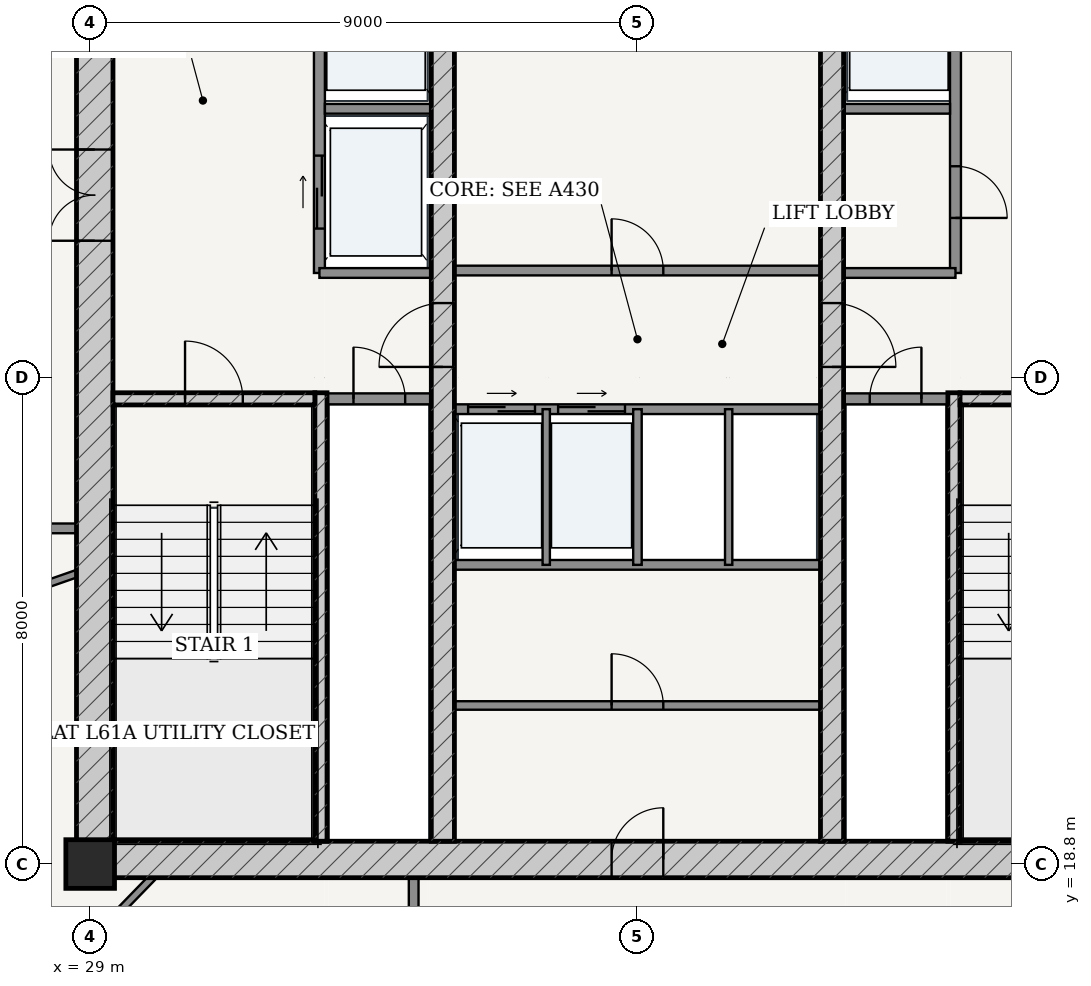
"""IFC4 building model, lengths in metres.
Left out: names, types, materials, properties, quantities, classifications, styles, units other than length and angle.
Written with IfcOpenShell. Run it as: python <this file> out.ifc"""

import sys

from ifc_helpers import new_model, si_unit, direction, frame, frame_2d, origin, origin_2d, place, context, subcontext, project, spatial, rectangle, extrude, source, transform, mapped, element, fill, save


model = new_model("IFC4")
c1 = context("Model", 3, precision=1e-05, world=origin(), true_north=direction((-0.2419218956, 0.970295726276)))
c2 = subcontext(c1, "Body", "Model", "MODEL_VIEW")
j1 = project(units=[si_unit("LENGTHUNIT", "METRE"), si_unit("PLANEANGLEUNIT", "RADIAN")], contexts=[c1])
p1 = place(None, origin())
s1 = spatial("IfcSite", under=j1, at=p1, CompositionType="ELEMENT")
p2 = place(p1, origin())
s2 = spatial("IfcBuilding", under=s1, at=p2, CompositionType="ELEMENT")
p3 = place(p2, frame((0.0, 0.0, 231.9)))
s3 = spatial("IfcBuildingStorey", under=s2, at=p3, CompositionType="ELEMENT", Elevation=231.9)
p4 = place(p3, frame((29.0, 18.8, 0.0), z_axis=(0.0, 0.0, 1.0), x_axis=(1.0, 0.0, 0.0)))
e1 = element("IfcColumn", 1, at=p4, inside=s3, PredefinedType="COLUMN", context=c2, shape_type="SweptSolid", body=[
    extrude(rectangle(XDim=0.8, YDim=0.8, at=origin_2d()), origin(), (0.0, 0.0, 1.0), 3.7),
])
p5 = place(p3, frame((28.775, 18.875, 0.0), z_axis=(0.0, 0.0, 1.0), x_axis=(1.0, 0.0, 0.0)))
e2 = element("IfcWall", 2, at=p5, inside=s3, PredefinedType="SHEAR", context=c2, shape_type="SweptSolid", body=[
    extrude(rectangle(XDim=18.45, YDim=0.6, at=frame_2d((9.225, 0.0))), origin(), (0.0, 0.0, 1.0), 3.435),
])
p6 = place(p5, frame((8.8, 0.0, 0.0)))
e3 = element("IfcOpeningElement", 3, at=p6, cuts=e2, PredefinedType="OPENING", context=c2, shape_type="SweptSolid", body=[
    extrude(rectangle(XDim=0.85, YDim=2.1, at=frame_2d((0.425, 1.05))), frame((0.0, 0.31, 0.0), z_axis=(0.0, -1.0, 0.0), x_axis=(1.0, 0.0, 0.0)), (0.0, 0.0, 1.0), 0.62),
])
p7 = place(p3, frame((29.075, 19.175, 0.0), z_axis=(0.0, 0.0, 1.0), x_axis=(0.0, 1.0, 0.0)))
e4 = element("IfcWall", 4, at=p7, inside=s3, PredefinedType="SHEAR", context=c2, shape_type="SweptSolid", body=[
    extrude(rectangle(XDim=15.25, YDim=0.6, at=frame_2d((7.625, 0.0))), origin(), (0.0, 0.0, 1.0), 3.435),
])
p8 = place(p7, frame((9.875, 0.0, 0.0)))
e5 = element("IfcOpeningElement", 5, at=p8, cuts=e4, PredefinedType="OPENING", context=c2, shape_type="SweptSolid", body=[
    extrude(rectangle(XDim=1.5, YDim=2.2, at=frame_2d((0.75, 1.1))), frame((0.0, 0.31, 0.0), z_axis=(0.0, -1.0, 0.0), x_axis=(1.0, 0.0, 0.0)), (0.0, 0.0, 1.0), 0.62),
])
p9 = place(p3, frame((32.795, 19.175, 0.0), z_axis=(0.0, 0.0, 1.0), x_axis=(0.0, 1.0, 0.0)))
e6 = element("IfcWall", 6, at=p9, inside=s3, PredefinedType="SOLIDWALL", context=c2, shape_type="SweptSolid", body=[
    extrude(rectangle(XDim=7.375, YDim=0.2, at=frame_2d((3.688, 0.0))), origin(), (0.0, 0.0, 1.0), 3.435),
])
p10 = place(p3, frame((29.375, 26.45, 0.0), z_axis=(0.0, 0.0, 1.0), x_axis=(1.0, 0.0, 0.0)))
e7 = element("IfcWall", 7, at=p10, inside=s3, PredefinedType="SOLIDWALL", context=c2, shape_type="SweptSolid", body=[
    extrude(rectangle(XDim=3.32, YDim=0.2, at=frame_2d((1.66, 0.0))), origin(), (0.0, 0.0, 1.0), 3.435),
])
p11 = place(p10, frame((1.185, 0.0, 0.0)))
e8 = element("IfcOpeningElement", 8, at=p11, cuts=e7, PredefinedType="OPENING", context=c2, shape_type="SweptSolid", body=[
    extrude(rectangle(XDim=0.95, YDim=2.15, at=frame_2d((0.475, 1.075))), frame((0.0, 0.11, 0.0), z_axis=(0.0, -1.0, 0.0), x_axis=(1.0, 0.0, 0.0)), (0.0, 0.0, 1.0), 0.22),
])
p12 = place(p3, frame((43.205, 19.175, 0.0), z_axis=(0.0, 0.0, 1.0), x_axis=(0.0, 1.0, 0.0)))
e9 = element("IfcWall", 9, at=p12, inside=s3, PredefinedType="SOLIDWALL", context=c2, shape_type="SweptSolid", body=[
    extrude(rectangle(XDim=7.375, YDim=0.2, at=frame_2d((3.688, 0.0))), origin(), (0.0, 0.0, 1.0), 3.435),
])
p13 = place(p3, frame((43.305, 26.45, 0.0), z_axis=(0.0, 0.0, 1.0), x_axis=(1.0, 0.0, 0.0)))
e10 = element("IfcWall", 10, at=p13, inside=s3, PredefinedType="SOLIDWALL", context=c2, shape_type="SweptSolid", body=[
    extrude(rectangle(XDim=3.32, YDim=0.2, at=frame_2d((1.66, 0.0))), origin(), (0.0, 0.0, 1.0), 3.435),
])
p14 = place(p13, frame((1.185, 0.0, 0.0)))
e11 = element("IfcOpeningElement", 11, at=p14, cuts=e10, PredefinedType="OPENING", context=c2, shape_type="SweptSolid", body=[
    extrude(rectangle(XDim=0.95, YDim=2.15, at=frame_2d((0.475, 1.075))), frame((0.0, 0.11, 0.0), z_axis=(0.0, -1.0, 0.0), x_axis=(1.0, 0.0, 0.0)), (0.0, 0.0, 1.0), 0.22),
])
p15 = place(p3, frame((34.8, 19.175, 0.0), z_axis=(0.0, 0.0, 1.0), x_axis=(0.0, 1.0, 0.0)))
e12 = element("IfcWall", 12, at=p15, inside=s3, PredefinedType="SHEAR", context=c2, shape_type="SweptSolid", body=[
    extrude(rectangle(XDim=15.25, YDim=0.38, at=frame_2d((7.625, 0.0))), origin(), (0.0, 0.0, 1.0), 3.435),
])
p16 = place(p15, frame((7.8, 0.0, 0.0)))
e13 = element("IfcOpeningElement", 13, at=p16, cuts=e12, PredefinedType="OPENING", context=c2, shape_type="SweptSolid", body=[
    extrude(rectangle(XDim=1.05, YDim=2.15, at=frame_2d((0.525, 1.075))), frame((0.0, 0.2, 0.0), z_axis=(0.0, -1.0, 0.0), x_axis=(1.0, 0.0, 0.0)), (0.0, 0.0, 1.0), 0.4),
])
p17 = place(p3, frame((41.2, 19.175, 0.0), z_axis=(0.0, 0.0, 1.0), x_axis=(0.0, 1.0, 0.0)))
e14 = element("IfcWall", 14, at=p17, inside=s3, PredefinedType="SHEAR", context=c2, shape_type="SweptSolid", body=[
    extrude(rectangle(XDim=15.25, YDim=0.38, at=frame_2d((7.625, 0.0))), origin(), (0.0, 0.0, 1.0), 3.435),
])
p18 = place(p17, frame((7.8, 0.0, 0.0)))
e15 = element("IfcOpeningElement", 15, at=p18, cuts=e14, PredefinedType="OPENING", context=c2, shape_type="SweptSolid", body=[
    extrude(rectangle(XDim=1.05, YDim=2.15, at=frame_2d((0.525, 1.075))), frame((0.0, 0.2, 0.0), z_axis=(0.0, -1.0, 0.0), x_axis=(1.0, 0.0, 0.0)), (0.0, 0.0, 1.0), 0.4),
])
p19 = place(p3, frame((32.9, 26.45, 0.0), z_axis=(0.0, 0.0, 1.0), x_axis=(1.0, 0.0, 0.0)))
e16 = element("IfcWall", 16, at=p19, inside=s3, PredefinedType="PARTITIONING", context=c2, shape_type="SweptSolid", body=[
    extrude(rectangle(XDim=1.71, YDim=0.18, at=frame_2d((0.855, 0.0))), origin(), (0.0, 0.0, 1.0), 3.435),
])
p20 = place(p19, frame((0.43, 0.0, 0.0)))
e17 = element("IfcOpeningElement", 17, at=p20, cuts=e16, PredefinedType="OPENING", context=c2, shape_type="SweptSolid", body=[
    extrude(rectangle(XDim=0.85, YDim=2.1, at=frame_2d((0.425, 1.05))), frame((0.0, 0.1, 0.0), z_axis=(0.0, -1.0, 0.0), x_axis=(1.0, 0.0, 0.0)), (0.0, 0.0, 1.0), 0.2),
])
p21 = place(p3, frame((41.39, 26.45, 0.0), z_axis=(0.0, 0.0, 1.0), x_axis=(1.0, 0.0, 0.0)))
e18 = element("IfcWall", 18, at=p21, inside=s3, PredefinedType="PARTITIONING", context=c2, shape_type="SweptSolid", body=[
    extrude(rectangle(XDim=1.71, YDim=0.18, at=frame_2d((0.855, 0.0))), origin(), (0.0, 0.0, 1.0), 3.435),
])
p22 = place(p21, frame((0.43, 0.0, 0.0)))
e19 = element("IfcOpeningElement", 19, at=p22, cuts=e18, PredefinedType="OPENING", context=c2, shape_type="SweptSolid", body=[
    extrude(rectangle(XDim=0.85, YDim=2.1, at=frame_2d((0.425, 1.05))), frame((0.0, 0.1, 0.0), z_axis=(0.0, -1.0, 0.0), x_axis=(1.0, 0.0, 0.0)), (0.0, 0.0, 1.0), 0.2),
])
p23 = place(p3, frame((32.77, 28.52, 0.0), z_axis=(0.0, 0.0, 1.0), x_axis=(0.0, 1.0, 0.0)))
e20 = element("IfcWall", 20, at=p23, inside=s3, PredefinedType="PARTITIONING", context=c2, shape_type="SweptSolid", body=[
    extrude(rectangle(XDim=5.905, YDim=0.18, at=frame_2d((2.953, 0.0))), origin(), (0.0, 0.0, 1.0), 3.435),
])
p24 = place(p23, frame((3.655, 0.0, 0.0)))
e21 = element("IfcOpeningElement", 21, at=p24, cuts=e20, PredefinedType="OPENING", context=c2, shape_type="SweptSolid", body=[
    extrude(rectangle(XDim=1.15, YDim=2.2, at=frame_2d((0.575, 1.1))), frame((0.0, 0.1, 0.0), z_axis=(0.0, -1.0, 0.0), x_axis=(1.0, 0.0, 0.0)), (0.0, 0.0, 1.0), 0.2),
])
p25 = place(p23, frame((0.73, 0.0, 0.0)))
e22 = element("IfcOpeningElement", 22, at=p25, cuts=e20, PredefinedType="OPENING", context=c2, shape_type="SweptSolid", body=[
    extrude(rectangle(XDim=1.2, YDim=2.25, at=frame_2d((0.6, 1.125))), frame((0.0, 0.1, 0.0), z_axis=(0.0, -1.0, 0.0), x_axis=(1.0, 0.0, 0.0)), (0.0, 0.0, 1.0), 0.2),
])
p26 = place(p3, frame((32.86, 31.22, 0.0), z_axis=(0.0, 0.0, 1.0), x_axis=(1.0, 0.0, 0.0)))
e23 = element("IfcWall", 23, at=p26, inside=s3, PredefinedType="PARTITIONING", context=c2, shape_type="SweptSolid", body=[
    extrude(rectangle(XDim=1.75, YDim=0.16, at=frame_2d((0.875, 0.0))), origin(), (0.0, 0.0, 1.0), 3.435),
])
p27 = place(p3, frame((32.77, 28.52, 0.0), z_axis=(0.0, 0.0, 1.0), x_axis=(1.0, 0.0, 0.0)))
e24 = element("IfcWall", 24, at=p27, inside=s3, PredefinedType="PARTITIONING", context=c2, shape_type="SweptSolid", body=[
    extrude(rectangle(XDim=1.84, YDim=0.16, at=frame_2d((0.92, 0.0))), origin(), (0.0, 0.0, 1.0), 3.435),
])
p28 = place(p3, frame((43.23, 28.52, 0.0), z_axis=(0.0, 0.0, 1.0), x_axis=(0.0, 1.0, 0.0)))
e25 = element("IfcWall", 25, at=p28, inside=s3, PredefinedType="PARTITIONING", context=c2, shape_type="SweptSolid", body=[
    extrude(rectangle(XDim=5.905, YDim=0.18, at=frame_2d((2.953, 0.0))), origin(), (0.0, 0.0, 1.0), 3.435),
])
p29 = place(p28, frame((0.905, 0.0, 0.0)))
e26 = element("IfcOpeningElement", 26, at=p29, cuts=e25, PredefinedType="OPENING", context=c2, shape_type="SweptSolid", body=[
    extrude(rectangle(XDim=0.85, YDim=2.1, at=frame_2d((0.425, 1.05))), frame((0.0, 0.1, 0.0), z_axis=(0.0, -1.0, 0.0), x_axis=(1.0, 0.0, 0.0)), (0.0, 0.0, 1.0), 0.2),
])
p30 = place(p28, frame((3.655, 0.0, 0.0)))
e27 = element("IfcOpeningElement", 27, at=p30, cuts=e25, PredefinedType="OPENING", context=c2, shape_type="SweptSolid", body=[
    extrude(rectangle(XDim=1.15, YDim=2.2, at=frame_2d((0.575, 1.1))), frame((0.0, 0.1, 0.0), z_axis=(0.0, -1.0, 0.0), x_axis=(1.0, 0.0, 0.0)), (0.0, 0.0, 1.0), 0.2),
])
p31 = place(p3, frame((41.39, 31.22, 0.0), z_axis=(0.0, 0.0, 1.0), x_axis=(1.0, 0.0, 0.0)))
e28 = element("IfcWall", 28, at=p31, inside=s3, PredefinedType="PARTITIONING", context=c2, shape_type="SweptSolid", body=[
    extrude(rectangle(XDim=1.75, YDim=0.16, at=frame_2d((0.875, 0.0))), origin(), (0.0, 0.0, 1.0), 3.435),
])
p32 = place(p3, frame((41.39, 28.52, 0.0), z_axis=(0.0, 0.0, 1.0), x_axis=(1.0, 0.0, 0.0)))
e29 = element("IfcWall", 29, at=p32, inside=s3, PredefinedType="PARTITIONING", context=c2, shape_type="SweptSolid", body=[
    extrude(rectangle(XDim=1.84, YDim=0.16, at=frame_2d((0.92, 0.0))), origin(), (0.0, 0.0, 1.0), 3.435),
])
p33 = place(p3, frame((34.99, 28.56, 0.0), z_axis=(0.0, 0.0, 1.0), x_axis=(1.0, 0.0, 0.0)))
e30 = element("IfcWall", 30, at=p33, inside=s3, PredefinedType="PARTITIONING", context=c2, shape_type="SweptSolid", body=[
    extrude(rectangle(XDim=6.02, YDim=0.16, at=frame_2d((3.01, 0.0))), origin(), (0.0, 0.0, 1.0), 3.435),
])
p34 = place(p33, frame((2.585, 0.0, 0.0)))
e31 = element("IfcOpeningElement", 31, at=p34, cuts=e30, PredefinedType="OPENING", context=c2, shape_type="SweptSolid", body=[
    extrude(rectangle(XDim=0.85, YDim=2.1, at=frame_2d((0.425, 1.05))), frame((0.0, 0.09, 0.0), z_axis=(0.0, -1.0, 0.0), x_axis=(1.0, 0.0, 0.0)), (0.0, 0.0, 1.0), 0.18),
])
p35 = place(p3, frame((34.99, 26.28, 0.0), z_axis=(0.0, 0.0, 1.0), x_axis=(1.0, 0.0, 0.0)))
e32 = element("IfcWall", 32, at=p35, inside=s3, PredefinedType="PARTITIONING", context=c2, shape_type="SweptSolid", body=[
    extrude(rectangle(XDim=6.02, YDim=0.16, at=frame_2d((3.01, 0.0))), origin(), (0.0, 0.0, 1.0), 3.435),
])
p36 = place(p35, frame((0.225, 0.0, 0.0)))
e33 = element("IfcOpeningElement", 33, at=p36, cuts=e32, PredefinedType="OPENING", context=c2, shape_type="SweptSolid", body=[
    extrude(rectangle(XDim=1.1, YDim=2.2, at=frame_2d((0.55, 1.1))), frame((0.0, 0.09, 0.0), z_axis=(0.0, -1.0, 0.0), x_axis=(1.0, 0.0, 0.0)), (0.0, 0.0, 1.0), 0.18),
])
p37 = place(p35, frame((1.705, 0.0, 0.0)))
e34 = element("IfcOpeningElement", 34, at=p37, cuts=e32, PredefinedType="OPENING", context=c2, shape_type="SweptSolid", body=[
    extrude(rectangle(XDim=1.1, YDim=2.2, at=frame_2d((0.55, 1.1))), frame((0.0, 0.09, 0.0), z_axis=(0.0, -1.0, 0.0), x_axis=(1.0, 0.0, 0.0)), (0.0, 0.0, 1.0), 0.18),
])
p38 = place(p3, frame((34.99, 23.72, 0.0), z_axis=(0.0, 0.0, 1.0), x_axis=(1.0, 0.0, 0.0)))
e35 = element("IfcWall", 35, at=p38, inside=s3, PredefinedType="PARTITIONING", context=c2, shape_type="SweptSolid", body=[
    extrude(rectangle(XDim=6.02, YDim=0.16, at=frame_2d((3.01, 0.0))), origin(), (0.0, 0.0, 1.0), 3.435),
])
p39 = place(p3, frame((36.5, 23.72, 0.0), z_axis=(0.0, 0.0, 1.0), x_axis=(0.0, 1.0, 0.0)))
e36 = element("IfcWall", 36, at=p39, inside=s3, PredefinedType="PARTITIONING", context=c2, shape_type="SweptSolid", body=[
    extrude(rectangle(XDim=2.56, YDim=0.12, at=frame_2d((1.28, 0.0))), origin(), (0.0, 0.0, 1.0), 3.435),
])
p40 = place(p3, frame((38.0, 23.72, 0.0), z_axis=(0.0, 0.0, 1.0), x_axis=(0.0, 1.0, 0.0)))
e37 = element("IfcWall", 37, at=p40, inside=s3, PredefinedType="PARTITIONING", context=c2, shape_type="SweptSolid", body=[
    extrude(rectangle(XDim=2.56, YDim=0.14, at=frame_2d((1.28, 0.0))), origin(), (0.0, 0.0, 1.0), 3.435),
])
p41 = place(p3, frame((39.5, 23.72, 0.0), z_axis=(0.0, 0.0, 1.0), x_axis=(0.0, 1.0, 0.0)))
e38 = element("IfcWall", 38, at=p41, inside=s3, PredefinedType="PARTITIONING", context=c2, shape_type="SweptSolid", body=[
    extrude(rectangle(XDim=2.56, YDim=0.12, at=frame_2d((1.28, 0.0))), origin(), (0.0, 0.0, 1.0), 3.435),
])
p42 = place(p3, frame((34.99, 21.407, 0.0), z_axis=(0.0, 0.0, 1.0), x_axis=(1.0, 0.0, 0.0)))
e39 = element("IfcWall", 39, at=p42, inside=s3, PredefinedType="PARTITIONING", context=c2, shape_type="SweptSolid", body=[
    extrude(rectangle(XDim=6.02, YDim=0.14, at=frame_2d((3.01, 0.0))), origin(), (0.0, 0.0, 1.0), 3.435),
])
p43 = place(p42, frame((2.585, 0.0, 0.0)))
e40 = element("IfcOpeningElement", 40, at=p43, cuts=e39, PredefinedType="OPENING", context=c2, shape_type="SweptSolid", body=[
    extrude(rectangle(XDim=0.85, YDim=2.1, at=frame_2d((0.425, 1.05))), frame((0.0, 0.08, 0.0), z_axis=(0.0, -1.0, 0.0), x_axis=(1.0, 0.0, 0.0)), (0.0, 0.0, 1.0), 0.16),
])
p44 = place(p3, frame((26.845, 24.32, 0.0), z_axis=(0.0, 0.0, 1.0), x_axis=(1.0, 0.0, 0.0)))
e41 = element("IfcWall", 41, at=p44, inside=s3, PredefinedType="PARTITIONING", context=c2, shape_type="SweptSolid", body=[
    extrude(rectangle(XDim=1.93, YDim=0.16, at=frame_2d((0.965, 0.0))), origin(), (0.0, 0.0, 1.0), 3.435),
])
p45 = place(p3, frame((34.32, 16.725, 0.0), z_axis=(0.0, 0.0, 1.0), x_axis=(0.0, 1.0, 0.0)))
e42 = element("IfcWall", 42, at=p45, inside=s3, PredefinedType="PARTITIONING", context=c2, shape_type="SweptSolid", body=[
    extrude(rectangle(XDim=1.85, YDim=0.16, at=frame_2d((0.925, 0.0))), origin(), (0.0, 0.0, 1.0), 3.435),
])
p46 = place(p3, frame((28.775, 23.575, 0.0), z_axis=(0.0, 0.0, 1.0), x_axis=(-0.943974645063, -0.330017983569, 0.0)))
e43 = element("IfcWall", 43, at=p46, inside=s3, PredefinedType="PARTITIONING", context=c2, shape_type="SweptSolid", body=[
    extrude(rectangle(XDim=4.875, YDim=0.12, at=frame_2d((2.437, 0.0))), origin(), (0.0, 0.0, 1.0), 3.11),
])
p47 = place(p46, frame((1.987, 0.0, 0.0)))
e44 = element("IfcOpeningElement", 44, at=p47, cuts=e43, PredefinedType="OPENING", context=c2, shape_type="SweptSolid", body=[
    extrude(rectangle(XDim=0.9, YDim=2.15, at=frame_2d((0.45, 1.075))), frame((0.0, 0.07, 0.0), z_axis=(0.0, -1.0, 0.0), x_axis=(1.0, 0.0, 0.0)), (0.0, 0.0, 1.0), 0.14),
])
p48 = place(p3, frame((30.018, 18.575, 0.0), z_axis=(0.0, 0.0, 1.0), x_axis=(-0.696436677683, -0.717618250867, 0.0)))
e45 = element("IfcWall", 45, at=p48, inside=s3, PredefinedType="PARTITIONING", context=c2, shape_type="SweptSolid", body=[
    extrude(rectangle(XDim=3.631, YDim=0.12, at=frame_2d((1.815, 0.0))), origin(), (0.0, 0.0, 1.0), 2.951),
])
p49 = place(p48, frame((1.385, 0.0, 0.0)))
e46 = element("IfcOpeningElement", 46, at=p49, cuts=e45, PredefinedType="OPENING", context=c2, shape_type="SweptSolid", body=[
    extrude(rectangle(XDim=0.86, YDim=2.15, at=frame_2d((0.43, 1.075))), frame((0.0, 0.07, 0.0), z_axis=(0.0, -1.0, 0.0), x_axis=(1.0, 0.0, 0.0)), (0.0, 0.0, 1.0), 0.14),
])
m1 = source(origin(), c2, "Body", "SweptSolid", [
    extrude(rectangle(XDim=1.5, YDim=2.2, at=frame_2d((0.75, 1.1))), frame((0.0, 0.025, 0.0), z_axis=(0.0, -1.0, 0.0), x_axis=(1.0, 0.0, 0.0)), (0.0, 0.0, 1.0), 0.05),
])
p50 = place(p8, origin())
e47 = element("IfcDoor", 47, at=p50, inside=s3, OperationType="DOUBLE_DOOR_SINGLE_SWING", PredefinedType="DOOR", context=c2, shape_type="MappedRepresentation", body=[
    mapped(m1, transform((0.0, 0.0, 0.0), scale=1.0)),
])
fill(e5, e47)
m2 = source(origin(), c2, "Body", "SweptSolid", [
    extrude(rectangle(XDim=1.05, YDim=2.15, at=frame_2d((0.525, 1.075))), frame((0.0, 0.025, 0.0), z_axis=(0.0, -1.0, 0.0), x_axis=(1.0, 0.0, 0.0)), (0.0, 0.0, 1.0), 0.05),
])
p51 = place(p16, origin())
e48 = element("IfcDoor", 48, at=p51, inside=s3, OperationType="SINGLE_SWING_LEFT", PredefinedType="DOOR", context=c2, shape_type="MappedRepresentation", body=[
    mapped(m2, transform((0.0, 0.0, 0.0), scale=1.0)),
])
fill(e13, e48)
p52 = place(p18, frame((1.05, 0.0, 0.0), z_axis=(0.0, 0.0, 1.0), x_axis=(-1.0, 0.0, 0.0)))
e49 = element("IfcDoor", 49, at=p52, inside=s3, OperationType="SINGLE_SWING_RIGHT", PredefinedType="DOOR", context=c2, shape_type="MappedRepresentation", body=[
    mapped(m2, transform((0.0, 0.0, 0.0), scale=1.0)),
])
fill(e15, e49)
m3 = source(origin(), c2, "Body", "SweptSolid", [
    extrude(rectangle(XDim=0.95, YDim=2.15, at=frame_2d((0.475, 1.075))), frame((0.0, 0.025, 0.0), z_axis=(0.0, -1.0, 0.0), x_axis=(1.0, 0.0, 0.0)), (0.0, 0.0, 1.0), 0.05),
])
p53 = place(p11, origin())
e50 = element("IfcDoor", 50, at=p53, inside=s3, OperationType="SINGLE_SWING_LEFT", PredefinedType="DOOR", context=c2, shape_type="MappedRepresentation", body=[
    mapped(m3, transform((0.0, 0.0, 0.0), scale=1.0)),
])
fill(e8, e50)
m4 = source(origin(), c2, "Body", "SweptSolid", [
    extrude(rectangle(XDim=0.85, YDim=2.1, at=frame_2d((0.425, 1.05))), frame((0.0, 0.025, 0.0), z_axis=(0.0, -1.0, 0.0), x_axis=(1.0, 0.0, 0.0)), (0.0, 0.0, 1.0), 0.05),
])
p54 = place(p20, origin())
e51 = element("IfcDoor", 51, at=p54, inside=s3, OperationType="SINGLE_SWING_LEFT", PredefinedType="DOOR", context=c2, shape_type="MappedRepresentation", body=[
    mapped(m4, transform((0.0, 0.0, 0.0), scale=1.0)),
])
fill(e17, e51)
p55 = place(p22, origin())
e52 = element("IfcDoor", 52, at=p55, inside=s3, OperationType="SINGLE_SWING_RIGHT", PredefinedType="DOOR", context=c2, shape_type="MappedRepresentation", body=[
    mapped(m4, transform((0.0, 0.0, 0.0), scale=1.0)),
])
fill(e19, e52)
p56 = place(p29, frame((0.85, 0.0, 0.0), z_axis=(0.0, 0.0, 1.0), x_axis=(-1.0, 0.0, 0.0)))
e53 = element("IfcDoor", 53, at=p56, inside=s3, OperationType="SINGLE_SWING_RIGHT", PredefinedType="DOOR", context=c2, shape_type="MappedRepresentation", body=[
    mapped(m4, transform((0.0, 0.0, 0.0), scale=1.0)),
])
fill(e26, e53)
p57 = place(p34, origin())
e54 = element("IfcDoor", 54, at=p57, inside=s3, OperationType="SINGLE_SWING_LEFT", PredefinedType="DOOR", context=c2, shape_type="MappedRepresentation", body=[
    mapped(m4, transform((0.0, 0.0, 0.0), scale=1.0)),
])
fill(e31, e54)
p58 = place(p6, origin())
e55 = element("IfcDoor", 55, at=p58, inside=s3, OperationType="SINGLE_SWING_RIGHT", PredefinedType="DOOR", context=c2, shape_type="MappedRepresentation", body=[
    mapped(m4, transform((0.0, 0.0, 0.0), scale=1.0)),
])
fill(e3, e55)
p59 = place(p43, origin())
e56 = element("IfcDoor", 56, at=p59, inside=s3, OperationType="SINGLE_SWING_LEFT", PredefinedType="DOOR", context=c2, shape_type="MappedRepresentation", body=[
    mapped(m4, transform((0.0, 0.0, 0.0), scale=1.0)),
])
fill(e40, e56)
m5 = source(origin(), c2, "Body", "SweptSolid", [
    extrude(rectangle(XDim=1.2, YDim=2.25, at=frame_2d((0.6, 1.125))), frame((0.0, 0.025, 0.0), z_axis=(0.0, -1.0, 0.0), x_axis=(1.0, 0.0, 0.0)), (0.0, 0.0, 1.0), 0.05),
])
p60 = place(p25, origin())
e57 = element("IfcDoor", 57, at=p60, inside=s3, OperationType="DOUBLE_DOOR_SLIDING", PredefinedType="DOOR", context=c2, shape_type="MappedRepresentation", body=[
    mapped(m5, transform((0.0, 0.0, 0.0), scale=1.0)),
])
fill(e22, e57)
m6 = source(origin(), c2, "Body", "SweptSolid", [
    extrude(rectangle(XDim=1.1, YDim=2.2, at=frame_2d((0.55, 1.1))), frame((0.0, 0.025, 0.0), z_axis=(0.0, -1.0, 0.0), x_axis=(1.0, 0.0, 0.0)), (0.0, 0.0, 1.0), 0.05),
])
p61 = place(p36, origin())
e58 = element("IfcDoor", 58, at=p61, inside=s3, OperationType="DOUBLE_DOOR_SLIDING", PredefinedType="DOOR", context=c2, shape_type="MappedRepresentation", body=[
    mapped(m6, transform((0.0, 0.0, 0.0), scale=1.0)),
])
fill(e33, e58)
p62 = place(p37, origin())
e59 = element("IfcDoor", 59, at=p62, inside=s3, OperationType="DOUBLE_DOOR_SLIDING", PredefinedType="DOOR", context=c2, shape_type="MappedRepresentation", body=[
    mapped(m6, transform((0.0, 0.0, 0.0), scale=1.0)),
])
fill(e34, e59)
save(model, sys.argv[1])
